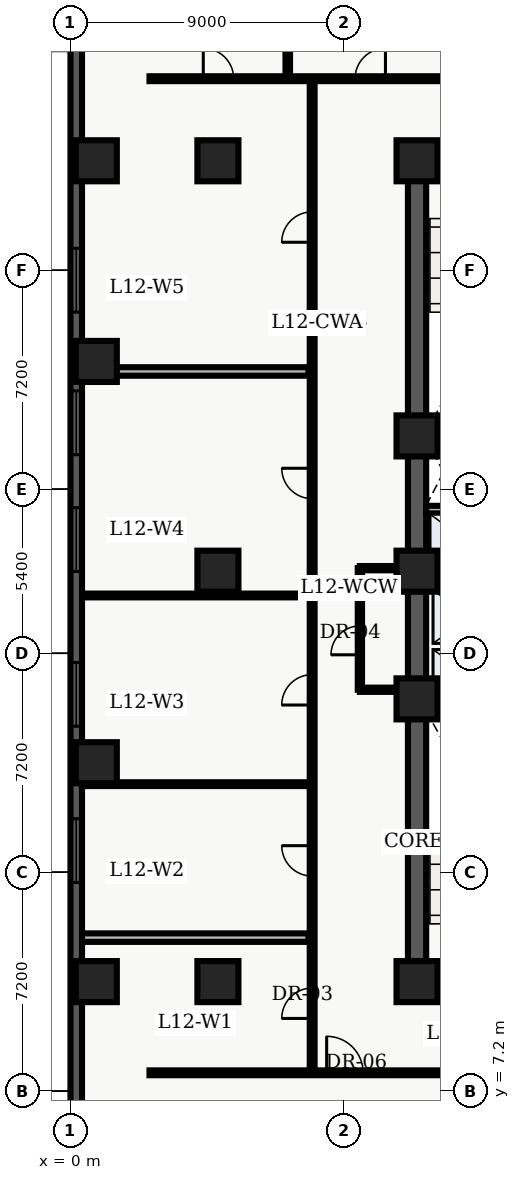
"""IFC4 building model, lengths in metres.
Left out: names, types, materials, properties, quantities, classifications, styles, units other than length and angle.
Written with IfcOpenShell. Run it as: python <this file> out.ifc"""

import sys

from ifc_helpers import new_model, entity, si_unit, converted_unit, direction, frame, origin_with_axes, origin_2d_with_axis, place, context, subcontext, project, spatial, polyline, rectangle, outline, extrude, element, fill, save


model = new_model("IFC4")
c1 = context("Model", 3, precision=1e-05, world=origin_with_axes(), true_north=direction((0.0, 1.0)))
c2 = subcontext(c1, "Body", "Model", "MODEL_VIEW")
j1 = project(units=[si_unit("LENGTHUNIT", "METRE"), converted_unit("PLANEANGLEUNIT", "DEGREE", entity("IfcPlaneAngleMeasure", 0.017), si_unit("PLANEANGLEUNIT", "RADIAN"), dimensions=[0, 0, 0, 0, 0, 0, 0])], contexts=[c1])
p1 = place(None, origin_with_axes())
s1 = spatial("IfcSite", under=j1, at=p1, CompositionType="ELEMENT")
p2 = place(p1, origin_with_axes())
s2 = spatial("IfcBuilding", under=s1, at=p2, CompositionType="ELEMENT")
p3 = place(p2, frame((0.0, 0.0, 52.2), z_axis=(0.0, 0.0, 1.0), x_axis=(1.0, 0.0, 0.0)))
s3 = spatial("IfcBuildingStorey", under=s2, at=p3, CompositionType="ELEMENT", Elevation=52.2)
p4 = place(p3, frame((11.4, 10.8, 0.0), z_axis=(0.0, 0.0, 1.0), x_axis=(0.0, 1.0, 0.0)))
e1 = element("IfcWall", 1, at=p4, inside=s3, PredefinedType="SHEAR", context=c2, shape_type="SweptSolid", body=[
    extrude(outline(polyline([(0.0, -0.3), (27.0, -0.3), (27.0, 0.3), (0.0, 0.3), (0.0, -0.3)])), origin_with_axes(), (0.0, 0.0, 1.0), 3.66),
])
p5 = place(p3, frame((11.4, 10.8, 0.0), z_axis=(0.0, 0.0, 1.0), x_axis=(1.0, 0.0, 0.0)))
e2 = element("IfcWall", 2, at=p5, inside=s3, PredefinedType="SHEAR", context=c2, shape_type="SweptSolid", body=[
    extrude(outline(polyline([(0.0, -0.3), (7.2, -0.3), (7.2, 0.3), (0.0, 0.3), (0.0, -0.3)])), origin_with_axes(), (0.0, 0.0, 1.0), 3.66),
])
p6 = place(p5, frame((2.625, 0.0, 0.0), z_axis=(0.0, 0.0, 1.0), x_axis=(1.0, 0.0, 0.0)))
e3 = element("IfcOpeningElement", 3, at=p6, cuts=e2, PredefinedType="OPENING", context=c2, shape_type="SweptSolid", body=[
    extrude(rectangle(XDim=1.05, YDim=0.62, at=origin_2d_with_axis()), origin_with_axes(), (0.0, 0.0, 1.0), 2.15),
])
p7 = place(p3, frame((11.4, 37.8, 0.0), z_axis=(0.0, 0.0, 1.0), x_axis=(1.0, 0.0, 0.0)))
e4 = element("IfcWall", 4, at=p7, inside=s3, PredefinedType="SHEAR", context=c2, shape_type="SweptSolid", body=[
    extrude(outline(polyline([(0.0, -0.3), (7.2, -0.3), (7.2, 0.3), (0.0, 0.3), (0.0, -0.3)])), origin_with_axes(), (0.0, 0.0, 1.0), 3.66),
])
p8 = place(p7, frame((2.625, 0.0, 0.0), z_axis=(0.0, 0.0, 1.0), x_axis=(1.0, 0.0, 0.0)))
e5 = element("IfcOpeningElement", 5, at=p8, cuts=e4, PredefinedType="OPENING", context=c2, shape_type="SweptSolid", body=[
    extrude(rectangle(XDim=1.05, YDim=0.62, at=origin_2d_with_axis()), origin_with_axes(), (0.0, 0.0, 1.0), 2.15),
])
for number, where, z_axis, x_axis in (
    (6, (11.7, 19.825, 0.0), (0.0, 0.0, 1.0), (1.0, 0.0, 0.0)),
    (7, (11.7, 28.775, 0.0), (0.0, 0.0, 1.0), (1.0, 0.0, 0.0)),
):
    element("IfcWall", number, at=place(p3, frame(where, z_axis=z_axis, x_axis=x_axis)), inside=s3, PredefinedType="SHEAR", context=c2, shape_type="SweptSolid", body=[
        extrude(outline(polyline([(0.0, -0.125), (6.6, -0.125), (6.6, 0.125), (0.0, 0.125), (0.0, -0.125)])), origin_with_axes(), (0.0, 0.0, 1.0), 3.66),
    ])
p9 = place(p3, frame((11.7, 24.1, 0.0), z_axis=(0.0, 0.0, 1.0), x_axis=(1.0, 0.0, 0.0)))
e8 = element("IfcWall", 8, at=p9, inside=s3, PredefinedType="SOLIDWALL", context=c2, shape_type="SweptSolid", body=[
    extrude(outline(polyline([(0.0, -0.125), (6.6, -0.125), (6.6, 0.125), (0.0, 0.125), (0.0, -0.125)])), origin_with_axes(), (0.0, 0.0, 1.0), 2.7),
])
p10 = place(p9, frame((3.75, 0.0, 0.0), z_axis=(0.0, 0.0, 1.0), x_axis=(1.0, 0.0, 0.0)))
e9 = element("IfcOpeningElement", 9, at=p10, cuts=e8, PredefinedType="OPENING", context=c2, shape_type="SweptSolid", body=[
    extrude(rectangle(XDim=0.9, YDim=0.27, at=origin_2d_with_axis()), origin_with_axes(), (0.0, 0.0, 1.0), 2.15),
])
p11 = place(p3, frame((11.7, 26.325, 0.0), z_axis=(0.0, 0.0, 1.0), x_axis=(1.0, 0.0, 0.0)))
e10 = element("IfcWall", 10, at=p11, inside=s3, PredefinedType="SOLIDWALL", context=c2, shape_type="SweptSolid", body=[
    extrude(outline(polyline([(0.0, -0.125), (6.6, -0.125), (6.6, 0.125), (0.0, 0.125), (0.0, -0.125)])), origin_with_axes(), (0.0, 0.0, 1.0), 2.7),
])
p12 = place(p11, frame((3.5, 0.0, 0.0), z_axis=(0.0, 0.0, 1.0), x_axis=(1.0, 0.0, 0.0)))
e11 = element("IfcOpeningElement", 11, at=p12, cuts=e10, PredefinedType="OPENING", context=c2, shape_type="SweptSolid", body=[
    extrude(rectangle(XDim=0.9, YDim=0.27, at=origin_2d_with_axis()), origin_with_axes(), (0.0, 0.0, 1.0), 2.15),
])
for number, where, z_axis, x_axis in (
    (12, (11.4, 10.8, 0.0), (0.0, 0.0, 1.0), (1.0, 0.0, 0.0)),
    (13, (11.4, 20.1, 0.0), (0.0, 0.0, 1.0), (1.0, 0.0, 0.0)),
    (14, (11.4, 24.3, 0.0), (0.0, 0.0, 1.0), (1.0, 0.0, 0.0)),
    (15, (11.4, 28.75, 0.0), (0.0, 0.0, 1.0), (1.0, 0.0, 0.0)),
    (16, (11.4, 37.8, 0.0), (0.0, 0.0, 1.0), (1.0, 0.0, 0.0)),
    (17, (4.85, 10.8, 0.0), (0.0, 0.0, 1.0), (1.0, 0.0, 0.0)),
    (18, (4.85, 24.3, 0.0), (0.0, 0.0, 1.0), (1.0, 0.0, 0.0)),
    (19, (4.85, 37.8, 0.0), (0.0, 0.0, 1.0), (1.0, 0.0, 0.0)),
    (20, (0.85, 10.8, 0.0), (0.0, 0.0, 1.0), (1.0, 0.0, 0.0)),
    (21, (0.85, 18.0, 0.0), (0.0, 0.0, 1.0), (1.0, 0.0, 0.0)),
    (22, (0.85, 31.2, 0.0), (0.0, 0.0, 1.0), (1.0, 0.0, 0.0)),
    (23, (0.85, 37.8, 0.0), (0.0, 0.0, 1.0), (1.0, 0.0, 0.0)),
):
    element("IfcColumn", number, at=place(p3, frame(where, z_axis=z_axis, x_axis=x_axis)), inside=s3, PredefinedType="COLUMN", context=c2, shape_type="SweptSolid", body=[
        extrude(rectangle(XDim=1.35, YDim=1.35, at=origin_2d_with_axis()), origin_with_axes(), (0.0, 0.0, 1.0), 3.9),
    ])
p13 = place(p3, frame((9.52, 20.4, 0.0), z_axis=(0.0, 0.0, 1.0), x_axis=(0.0, 1.0, 0.0)))
e24 = element("IfcWall", 24, at=p13, inside=s3, PredefinedType="PARTITIONING", context=c2, shape_type="SweptSolid", body=[
    extrude(outline(polyline([(0.0, -0.07), (4.0, -0.07), (4.0, 0.07), (0.0, 0.07), (0.0, -0.07)])), origin_with_axes(), (0.0, 0.0, 1.0), 2.7),
])
p14 = place(p13, frame((1.625, 0.0, 0.0), z_axis=(0.0, 0.0, 1.0), x_axis=(1.0, 0.0, 0.0)))
e25 = element("IfcOpeningElement", 25, at=p14, cuts=e24, PredefinedType="OPENING", context=c2, shape_type="SweptSolid", body=[
    extrude(rectangle(XDim=0.95, YDim=0.16, at=origin_2d_with_axis()), origin_with_axes(), (0.0, 0.0, 1.0), 2.15),
])
for number, where, z_axis, x_axis in (
    (26, (9.52, 20.4, 0.0), (0.0, 0.0, 1.0), (1.0, 0.0, 0.0)),
    (27, (9.52, 24.4, 0.0), (0.0, 0.0, 1.0), (1.0, 0.0, 0.0)),
):
    element("IfcWall", number, at=place(p3, frame(where, z_axis=z_axis, x_axis=x_axis)), inside=s3, PredefinedType="PARTITIONING", context=c2, shape_type="SweptSolid", body=[
        extrude(outline(polyline([(0.0, -0.07), (1.58, -0.07), (1.58, 0.07), (0.0, 0.07), (0.0, -0.07)])), origin_with_axes(), (0.0, 0.0, 1.0), 2.7),
    ])
p15 = place(p3, frame((2.6, 7.8, 0.0), z_axis=(0.0, 0.0, 1.0), x_axis=(1.0, 0.0, 0.0)))
e28 = element("IfcWall", 28, at=p15, inside=s3, PredefinedType="PARTITIONING", context=c2, shape_type="SweptSolid", body=[
    extrude(outline(polyline([(0.0, -0.08), (18.55, -0.08), (18.55, 0.08), (0.0, 0.08), (0.0, -0.08)])), origin_with_axes(), (0.0, 0.0, 1.0), 2.7),
])
p16 = place(p15, frame((6.426, 0.0, 0.0), z_axis=(0.0, 0.0, 1.0), x_axis=(1.0, 0.0, 0.0)))
e29 = element("IfcOpeningElement", 29, at=p16, cuts=e28, PredefinedType="OPENING", context=c2, shape_type="SweptSolid", body=[
    extrude(rectangle(XDim=1.2, YDim=0.18, at=origin_2d_with_axis()), origin_with_axes(), (0.0, 0.0, 1.0), 2.2),
])
p17 = place(p15, frame((15.681, 0.0, 0.0), z_axis=(0.0, 0.0, 1.0), x_axis=(1.0, 0.0, 0.0)))
e30 = element("IfcOpeningElement", 30, at=p17, cuts=e28, PredefinedType="OPENING", context=c2, shape_type="SweptSolid", body=[
    extrude(rectangle(XDim=1.0, YDim=0.18, at=origin_2d_with_axis()), origin_with_axes(), (0.0, 0.0, 1.0), 2.15),
])
p18 = place(p3, frame((2.6, 40.5, 0.0), z_axis=(0.0, 0.0, 1.0), x_axis=(1.0, 0.0, 0.0)))
e31 = element("IfcWall", 31, at=p18, inside=s3, PredefinedType="PARTITIONING", context=c2, shape_type="SweptSolid", body=[
    extrude(outline(polyline([(0.0, -0.08), (18.65, -0.08), (18.65, 0.08), (0.0, 0.08), (0.0, -0.08)])), origin_with_axes(), (0.0, 0.0, 1.0), 2.7),
])
p19 = place(p18, frame((2.268, 0.0, 0.0), z_axis=(0.0, 0.0, 1.0), x_axis=(1.0, 0.0, 0.0)))
e32 = element("IfcOpeningElement", 32, at=p19, cuts=e31, PredefinedType="OPENING", context=c2, shape_type="SweptSolid", body=[
    extrude(rectangle(XDim=1.0, YDim=0.18, at=origin_2d_with_axis()), origin_with_axes(), (0.0, 0.0, 1.0), 2.15),
])
p20 = place(p18, frame((7.261, 0.0, 0.0), z_axis=(0.0, 0.0, 1.0), x_axis=(1.0, 0.0, 0.0)))
e33 = element("IfcOpeningElement", 33, at=p20, cuts=e31, PredefinedType="OPENING", context=c2, shape_type="SweptSolid", body=[
    extrude(rectangle(XDim=1.0, YDim=0.18, at=origin_2d_with_axis()), origin_with_axes(), (0.0, 0.0, 1.0), 2.15),
])
p21 = place(p18, frame((13.197, 0.0, 0.0), z_axis=(0.0, 0.0, 1.0), x_axis=(1.0, 0.0, 0.0)))
e34 = element("IfcOpeningElement", 34, at=p21, cuts=e31, PredefinedType="OPENING", context=c2, shape_type="SweptSolid", body=[
    extrude(rectangle(XDim=1.0, YDim=0.18, at=origin_2d_with_axis()), origin_with_axes(), (0.0, 0.0, 1.0), 2.15),
])
p22 = place(p3, frame((7.95, 7.8, 0.0), z_axis=(0.0, 0.0, 1.0), x_axis=(0.0, 1.0, 0.0)))
e35 = element("IfcWall", 35, at=p22, inside=s3, PredefinedType="PARTITIONING", context=c2, shape_type="SweptSolid", body=[
    extrude(outline(polyline([(0.0, -0.08), (32.7, -0.08), (32.7, 0.08), (0.0, 0.08), (0.0, -0.08)])), origin_with_axes(), (0.0, 0.0, 1.0), 2.7),
])
p23 = place(p22, frame((2.288, 0.0, 0.0), z_axis=(0.0, 0.0, 1.0), x_axis=(1.0, 0.0, 0.0)))
e36 = element("IfcOpeningElement", 36, at=p23, cuts=e35, PredefinedType="OPENING", context=c2, shape_type="SweptSolid", body=[
    extrude(rectangle(XDim=1.0, YDim=0.18, at=origin_2d_with_axis()), origin_with_axes(), (0.0, 0.0, 1.0), 2.15),
])
p24 = place(p22, frame((6.971, 0.0, 0.0), z_axis=(0.0, 0.0, 1.0), x_axis=(1.0, 0.0, 0.0)))
e37 = element("IfcOpeningElement", 37, at=p24, cuts=e35, PredefinedType="OPENING", context=c2, shape_type="SweptSolid", body=[
    extrude(rectangle(XDim=1.0, YDim=0.18, at=origin_2d_with_axis()), origin_with_axes(), (0.0, 0.0, 1.0), 2.15),
])
p25 = place(p22, frame((12.598, 0.0, 0.0), z_axis=(0.0, 0.0, 1.0), x_axis=(1.0, 0.0, 0.0)))
e38 = element("IfcOpeningElement", 38, at=p25, cuts=e35, PredefinedType="OPENING", context=c2, shape_type="SweptSolid", body=[
    extrude(rectangle(XDim=1.0, YDim=0.18, at=origin_2d_with_axis()), origin_with_axes(), (0.0, 0.0, 1.0), 2.15),
])
p26 = place(p22, frame((19.386, 0.0, 0.0), z_axis=(0.0, 0.0, 1.0), x_axis=(1.0, 0.0, 0.0)))
e39 = element("IfcOpeningElement", 39, at=p26, cuts=e35, PredefinedType="OPENING", context=c2, shape_type="SweptSolid", body=[
    extrude(rectangle(XDim=1.0, YDim=0.18, at=origin_2d_with_axis()), origin_with_axes(), (0.0, 0.0, 1.0), 2.15),
])
p27 = place(p22, frame((27.82, 0.0, 0.0), z_axis=(0.0, 0.0, 1.0), x_axis=(1.0, 0.0, 0.0)))
e40 = element("IfcOpeningElement", 40, at=p27, cuts=e35, PredefinedType="OPENING", context=c2, shape_type="SweptSolid", body=[
    extrude(rectangle(XDim=1.0, YDim=0.18, at=origin_2d_with_axis()), origin_with_axes(), (0.0, 0.0, 1.0), 2.15),
])
p28 = place(p3, frame((0.375, 12.247, 0.0), z_axis=(0.0, 0.0, 1.0), x_axis=(1.0, 0.0, 0.0)))
e41 = element("IfcWall", 41, at=p28, inside=s3, PredefinedType="PARTITIONING", context=c2, shape_type="SweptSolid", body=[
    extrude(outline(polyline([(0.0, -0.14), (7.455, -0.14), (7.455, 0.14), (0.0, 0.14), (0.0, -0.14)])), origin_with_axes(), (0.0, 0.0, 1.0), 2.7),
])
for number, where, z_axis, x_axis in (
    (42, (0.375, 17.295, 0.0), (0.0, 0.0, 1.0), (1.0, 0.0, 0.0)),
    (43, (0.375, 23.501, 0.0), (0.0, 0.0, 1.0), (1.0, 0.0, 0.0)),
):
    element("IfcWall", number, at=place(p3, frame(where, z_axis=z_axis, x_axis=x_axis)), inside=s3, PredefinedType="PARTITIONING", context=c2, shape_type="SweptSolid", body=[
        extrude(outline(polyline([(0.0, -0.062), (7.455, -0.062), (7.455, 0.062), (0.0, 0.062), (0.0, -0.062)])), origin_with_axes(), (0.0, 0.0, 1.0), 2.7),
    ])
p29 = place(p3, frame((0.375, 30.87, 0.0), z_axis=(0.0, 0.0, 1.0), x_axis=(1.0, 0.0, 0.0)))
e44 = element("IfcWall", 44, at=p29, inside=s3, PredefinedType="PARTITIONING", context=c2, shape_type="SweptSolid", body=[
    extrude(outline(polyline([(0.0, -0.14), (7.455, -0.14), (7.455, 0.14), (0.0, 0.14), (0.0, -0.14)])), origin_with_axes(), (0.0, 0.0, 1.0), 2.7),
])
p30 = place(p3, frame((7.147, 40.6, 0.0), z_axis=(0.0, 0.0, 1.0), x_axis=(0.0, 1.0, 0.0)))
e45 = element("IfcWall", 45, at=p30, inside=s3, PredefinedType="PARTITIONING", context=c2, shape_type="SweptSolid", body=[
    extrude(outline(polyline([(0.0, -0.075), (7.64, -0.075), (7.64, 0.075), (0.0, 0.075), (0.0, -0.075)])), origin_with_axes(), (0.0, 0.0, 1.0), 2.7),
])
p31 = place(p3, frame((0.19, 2.78, 0.0), z_axis=(0.0, 0.0, 1.0), x_axis=(0.0, 1.0, 0.0)))
e46 = element("IfcWall", 46, at=p31, inside=s3, PredefinedType="SOLIDWALL", context=c2, shape_type="SweptSolid", body=[
    extrude(outline(polyline([(0.0, -0.19), (43.42, -0.19), (43.42, 0.19), (0.0, 0.19), (0.0, -0.19)])), origin_with_axes(), (0.0, 0.0, 1.0), 3.66),
])
p32 = place(p31, frame((2.946, 0.0, 0.45), z_axis=(0.0, 0.0, 1.0), x_axis=(1.0, 0.0, 0.0)))
e47 = element("IfcOpeningElement", 47, at=p32, cuts=e46, PredefinedType="OPENING", context=c2, shape_type="SweptSolid", body=[
    extrude(rectangle(XDim=2.1, YDim=0.4, at=origin_2d_with_axis()), origin_with_axes(), (0.0, 0.0, 1.0), 2.2),
])
p33 = place(p31, frame((12.328, 0.0, 0.45), z_axis=(0.0, 0.0, 1.0), x_axis=(1.0, 0.0, 0.0)))
e48 = element("IfcOpeningElement", 48, at=p33, cuts=e46, PredefinedType="OPENING", context=c2, shape_type="SweptSolid", body=[
    extrude(rectangle(XDim=2.1, YDim=0.4, at=origin_2d_with_axis()), origin_with_axes(), (0.0, 0.0, 1.0), 2.2),
])
p34 = place(p31, frame((17.469, 0.0, 0.45), z_axis=(0.0, 0.0, 1.0), x_axis=(1.0, 0.0, 0.0)))
e49 = element("IfcOpeningElement", 49, at=p34, cuts=e46, PredefinedType="OPENING", context=c2, shape_type="SweptSolid", body=[
    extrude(rectangle(XDim=2.1, YDim=0.4, at=origin_2d_with_axis()), origin_with_axes(), (0.0, 0.0, 1.0), 2.2),
])
p35 = place(p31, frame((22.56, 0.0, 0.45), z_axis=(0.0, 0.0, 1.0), x_axis=(1.0, 0.0, 0.0)))
e50 = element("IfcOpeningElement", 50, at=p35, cuts=e46, PredefinedType="OPENING", context=c2, shape_type="SweptSolid", body=[
    extrude(rectangle(XDim=2.1, YDim=0.4, at=origin_2d_with_axis()), origin_with_axes(), (0.0, 0.0, 1.0), 2.2),
])
p36 = place(p31, frame((26.401, 0.0, 0.45), z_axis=(0.0, 0.0, 1.0), x_axis=(1.0, 0.0, 0.0)))
e51 = element("IfcOpeningElement", 51, at=p36, cuts=e46, PredefinedType="OPENING", context=c2, shape_type="SweptSolid", body=[
    extrude(rectangle(XDim=2.1, YDim=0.4, at=origin_2d_with_axis()), origin_with_axes(), (0.0, 0.0, 1.0), 2.2),
])
p37 = place(p31, frame((31.092, 0.0, 0.45), z_axis=(0.0, 0.0, 1.0), x_axis=(1.0, 0.0, 0.0)))
e52 = element("IfcOpeningElement", 52, at=p37, cuts=e46, PredefinedType="OPENING", context=c2, shape_type="SweptSolid", body=[
    extrude(rectangle(XDim=2.1, YDim=0.4, at=origin_2d_with_axis()), origin_with_axes(), (0.0, 0.0, 1.0), 2.2),
])
p38 = place(p31, frame((40.024, 0.0, 0.45), z_axis=(0.0, 0.0, 1.0), x_axis=(1.0, 0.0, 0.0)))
e53 = element("IfcOpeningElement", 53, at=p38, cuts=e46, PredefinedType="OPENING", context=c2, shape_type="SweptSolid", body=[
    extrude(rectangle(XDim=2.1, YDim=0.4, at=origin_2d_with_axis()), origin_with_axes(), (0.0, 0.0, 1.0), 2.2),
])
p39 = place(p13, frame((1.625, 0.0, 0.0), z_axis=(0.0, 0.0, 1.0), x_axis=(1.0, 0.0, 0.0)))
e54 = element("IfcDoor", 54, at=p39, inside=s3, OperationType="SINGLE_SWING_LEFT", PredefinedType="DOOR", context=c2, shape_type="SweptSolid", body=[
    extrude(rectangle(XDim=0.95, YDim=0.084, at=origin_2d_with_axis()), origin_with_axes(), (0.0, 0.0, 1.0), 2.15),
])
fill(e25, e54)
p40 = place(p22, frame((2.288, 0.0, 0.0), z_axis=(0.0, 0.0, 1.0), x_axis=(1.0, 0.0, 0.0)))
e55 = element("IfcDoor", 55, at=p40, inside=s3, OperationType="SINGLE_SWING_LEFT", PredefinedType="DOOR", context=c2, shape_type="SweptSolid", body=[
    extrude(rectangle(XDim=1.0, YDim=0.09, at=origin_2d_with_axis()), origin_with_axes(), (0.0, 0.0, 1.0), 2.15),
])
fill(e36, e55)
p41 = place(p22, frame((6.971, 0.0, 0.0), z_axis=(0.0, 0.0, 1.0), x_axis=(1.0, 0.0, 0.0)))
e56 = element("IfcDoor", 56, at=p41, inside=s3, OperationType="SINGLE_SWING_RIGHT", PredefinedType="DOOR", context=c2, shape_type="SweptSolid", body=[
    extrude(rectangle(XDim=1.0, YDim=0.09, at=origin_2d_with_axis()), origin_with_axes(), (0.0, 0.0, 1.0), 2.15),
])
fill(e37, e56)
p42 = place(p22, frame((12.598, 0.0, 0.0), z_axis=(0.0, 0.0, 1.0), x_axis=(1.0, 0.0, 0.0)))
e57 = element("IfcDoor", 57, at=p42, inside=s3, OperationType="SINGLE_SWING_LEFT", PredefinedType="DOOR", context=c2, shape_type="SweptSolid", body=[
    extrude(rectangle(XDim=1.0, YDim=0.09, at=origin_2d_with_axis()), origin_with_axes(), (0.0, 0.0, 1.0), 2.15),
])
fill(e38, e57)
p43 = place(p22, frame((19.386, 0.0, 0.0), z_axis=(0.0, 0.0, 1.0), x_axis=(1.0, 0.0, 0.0)))
e58 = element("IfcDoor", 58, at=p43, inside=s3, OperationType="SINGLE_SWING_RIGHT", PredefinedType="DOOR", context=c2, shape_type="SweptSolid", body=[
    extrude(rectangle(XDim=1.0, YDim=0.09, at=origin_2d_with_axis()), origin_with_axes(), (0.0, 0.0, 1.0), 2.15),
])
fill(e39, e58)
p44 = place(p22, frame((27.82, 0.0, 0.0), z_axis=(0.0, 0.0, 1.0), x_axis=(1.0, 0.0, 0.0)))
e59 = element("IfcDoor", 59, at=p44, inside=s3, OperationType="SINGLE_SWING_LEFT", PredefinedType="DOOR", context=c2, shape_type="SweptSolid", body=[
    extrude(rectangle(XDim=1.0, YDim=0.09, at=origin_2d_with_axis()), origin_with_axes(), (0.0, 0.0, 1.0), 2.15),
])
fill(e40, e59)
p45 = place(p15, frame((6.426, 0.0, 0.0), z_axis=(0.0, 0.0, 1.0), x_axis=(1.0, 0.0, 0.0)))
e60 = element("IfcDoor", 60, at=p45, inside=s3, OperationType="SINGLE_SWING_LEFT", PredefinedType="DOOR", context=c2, shape_type="SweptSolid", body=[
    extrude(rectangle(XDim=1.2, YDim=0.09, at=origin_2d_with_axis()), origin_with_axes(), (0.0, 0.0, 1.0), 2.2),
])
fill(e29, e60)
p46 = place(p18, frame((2.268, 0.0, 0.0), z_axis=(0.0, 0.0, 1.0), x_axis=(1.0, 0.0, 0.0)))
e61 = element("IfcDoor", 61, at=p46, inside=s3, OperationType="SINGLE_SWING_LEFT", PredefinedType="DOOR", context=c2, shape_type="SweptSolid", body=[
    extrude(rectangle(XDim=1.0, YDim=0.09, at=origin_2d_with_axis()), origin_with_axes(), (0.0, 0.0, 1.0), 2.15),
])
fill(e32, e61)
p47 = place(p18, frame((7.261, 0.0, 0.0), z_axis=(0.0, 0.0, 1.0), x_axis=(1.0, 0.0, 0.0)))
e62 = element("IfcDoor", 62, at=p47, inside=s3, OperationType="SINGLE_SWING_RIGHT", PredefinedType="DOOR", context=c2, shape_type="SweptSolid", body=[
    extrude(rectangle(XDim=1.0, YDim=0.09, at=origin_2d_with_axis()), origin_with_axes(), (0.0, 0.0, 1.0), 2.15),
])
fill(e33, e62)
p48 = place(p31, frame((12.328, 0.0, 0.45), z_axis=(0.0, 0.0, 1.0), x_axis=(1.0, 0.0, 0.0)))
e63 = element("IfcWindow", 63, at=p48, inside=s3, PredefinedType="WINDOW", context=c2, shape_type="SweptSolid", body=[
    extrude(rectangle(XDim=2.1, YDim=0.09, at=origin_2d_with_axis()), origin_with_axes(), (0.0, 0.0, 1.0), 2.2),
])
fill(e48, e63)
p49 = place(p31, frame((17.469, 0.0, 0.45), z_axis=(0.0, 0.0, 1.0), x_axis=(1.0, 0.0, 0.0)))
e64 = element("IfcWindow", 64, at=p49, inside=s3, PredefinedType="WINDOW", context=c2, shape_type="SweptSolid", body=[
    extrude(rectangle(XDim=2.1, YDim=0.09, at=origin_2d_with_axis()), origin_with_axes(), (0.0, 0.0, 1.0), 2.2),
])
fill(e49, e64)
p50 = place(p31, frame((22.56, 0.0, 0.45), z_axis=(0.0, 0.0, 1.0), x_axis=(1.0, 0.0, 0.0)))
e65 = element("IfcWindow", 65, at=p50, inside=s3, PredefinedType="WINDOW", context=c2, shape_type="SweptSolid", body=[
    extrude(rectangle(XDim=2.1, YDim=0.09, at=origin_2d_with_axis()), origin_with_axes(), (0.0, 0.0, 1.0), 2.2),
])
fill(e50, e65)
p51 = place(p31, frame((26.401, 0.0, 0.45), z_axis=(0.0, 0.0, 1.0), x_axis=(1.0, 0.0, 0.0)))
e66 = element("IfcWindow", 66, at=p51, inside=s3, PredefinedType="WINDOW", context=c2, shape_type="SweptSolid", body=[
    extrude(rectangle(XDim=2.1, YDim=0.09, at=origin_2d_with_axis()), origin_with_axes(), (0.0, 0.0, 1.0), 2.2),
])
fill(e51, e66)
p52 = place(p31, frame((31.092, 0.0, 0.45), z_axis=(0.0, 0.0, 1.0), x_axis=(1.0, 0.0, 0.0)))
e67 = element("IfcWindow", 67, at=p52, inside=s3, PredefinedType="WINDOW", context=c2, shape_type="SweptSolid", body=[
    extrude(rectangle(XDim=2.1, YDim=0.09, at=origin_2d_with_axis()), origin_with_axes(), (0.0, 0.0, 1.0), 2.2),
])
fill(e52, e67)
save(model, sys.argv[1])
